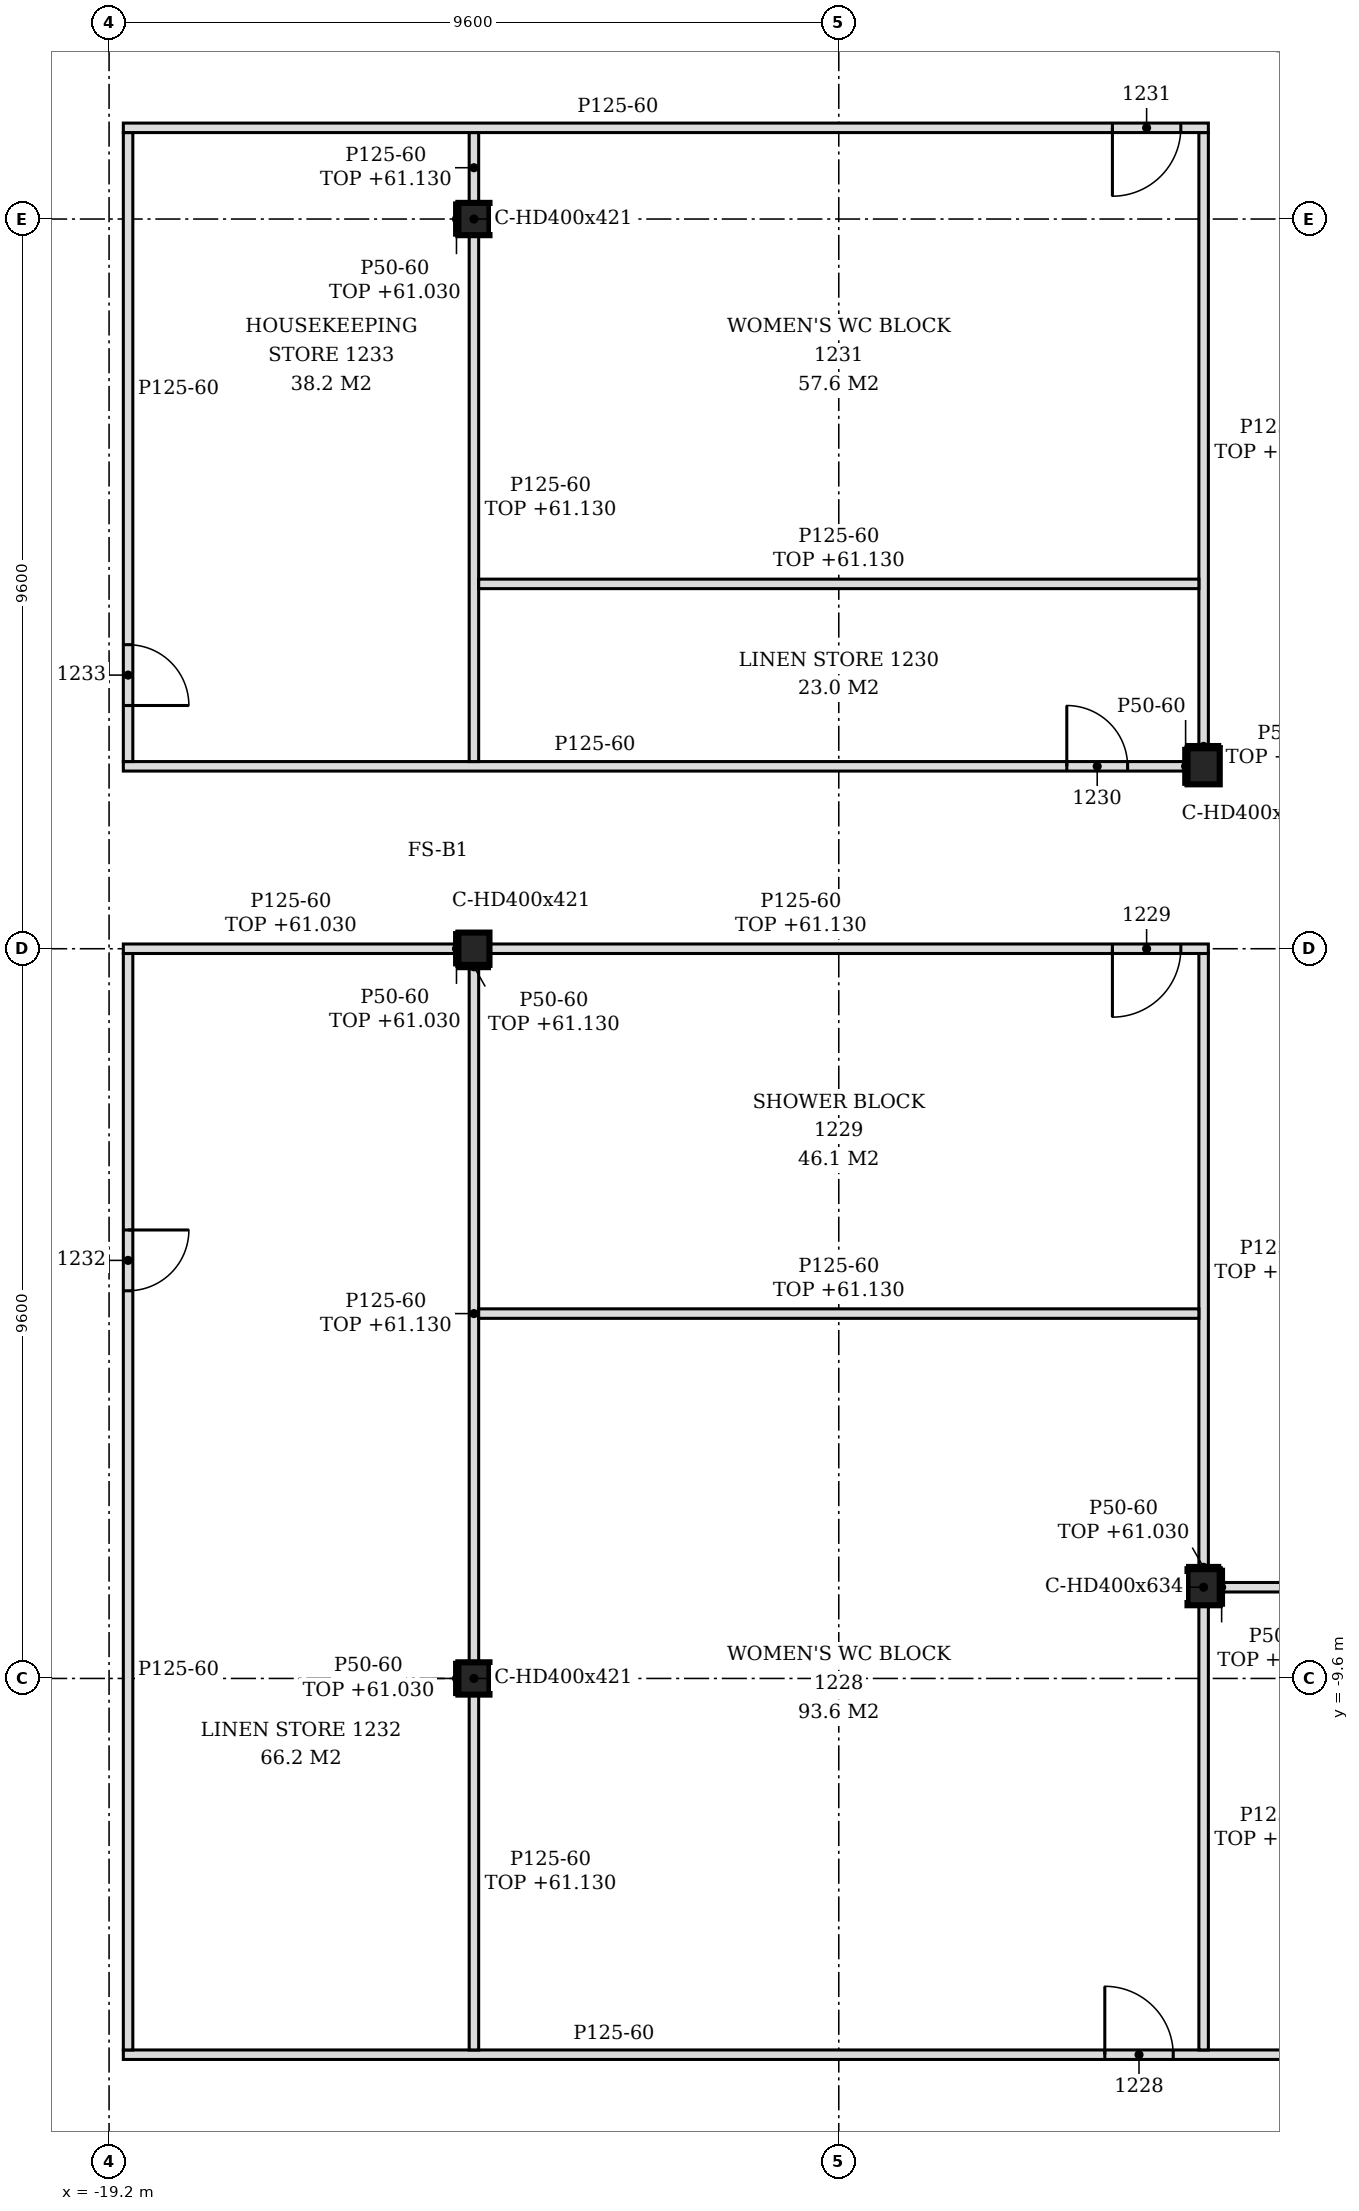
"""IFC4 building model, lengths in metres.
Left out: names, types, materials, properties, quantities, classifications, styles, units other than length and angle.
Written with IfcOpenShell. Run it as: python <this file> out.ifc"""

import sys

from ifc_helpers import new_model, si_unit, direction, frame, frame_2d, origin, origin_2d, place, context, subcontext, project, spatial, polyline, rectangle, i_section, outline, extrude, element, fill, save


model = new_model("IFC4")
c1 = context("Model", 3, precision=1e-05, world=origin(), true_north=direction((0.0, 1.0)))
c2 = subcontext(c1, "Body", "Model", "MODEL_VIEW")
j1 = project(units=[si_unit("LENGTHUNIT", "METRE"), si_unit("PLANEANGLEUNIT", "RADIAN")], contexts=[c1])
p1 = place(None, origin())
s1 = spatial("IfcSite", under=j1, at=p1, CompositionType="ELEMENT")
p2 = place(p1, origin())
s2 = spatial("IfcBuilding", under=s1, at=p2, CompositionType="ELEMENT")
p3 = place(p2, frame((0.0, 0.0, 58.2)))
s3 = spatial("IfcBuildingStorey", under=s2, at=p3, CompositionType="ELEMENT", Elevation=58.2)
for number, where, z_axis, x_axis in (
    (1, (-4.8, -8.4, -0.15), (0.0, 0.0, 1.0), (1.0, 0.0, 0.0)),
    (2, (-4.8, 2.4, -0.15), (0.0, 0.0, 1.0), (1.0, 0.0, 0.0)),
):
    element("IfcColumn", number, at=place(p3, frame(where, z_axis=z_axis, x_axis=x_axis)), inside=s3, PredefinedType="COLUMN", context=c2, shape_type="SweptSolid", body=[
        extrude(i_section(OverallWidth=0.424, OverallDepth=0.474, WebThickness=0.048, FlangeThickness=0.077, FilletRadius=0.015, at=origin_2d()), origin(), (0.0, 0.0, 1.0), 3.6),
    ])
for number, where, z_axis, x_axis in (
    (3, (-14.4, -9.6, -0.15), (0.0, 0.0, 1.0), (1.0, 0.0, 0.0)),
    (4, (-14.4, 0.0, -0.15), (0.0, 0.0, 1.0), (1.0, 0.0, 0.0)),
    (5, (-14.4, 9.6, -0.15), (0.0, 0.0, 1.0), (1.0, 0.0, 0.0)),
):
    element("IfcColumn", number, at=place(p3, frame(where, z_axis=z_axis, x_axis=x_axis)), inside=s3, PredefinedType="COLUMN", context=c2, shape_type="SweptSolid", body=[
        extrude(i_section(OverallWidth=0.409, OverallDepth=0.425, WebThickness=0.033, FlangeThickness=0.052, FilletRadius=0.015, at=origin_2d()), origin(), (0.0, 0.0, 1.0), 3.6),
    ])
p4 = place(p3, frame((-19.012, -14.55, 0.0), z_axis=(0.0, 0.0, 1.0), x_axis=(1.0, 0.0, 0.0)))
e6 = element("IfcWall", 6, at=p4, inside=s3, PredefinedType="PARTITIONING", context=c2, shape_type="SweptSolid", body=[
    extrude(outline(polyline([(0.0, 0.0), (19.075, 0.0), (19.075, 3.45), (14.363, 3.45), (14.361, 2.73), (14.062, 2.73), (14.061, 3.45), (4.762, 3.45), (4.76, 2.93), (4.462, 2.93), (4.46, 2.83), (0.0, 2.83), (0.0, 0.0)])), frame((0.0, 0.062, 0.0), z_axis=(0.0, -1.0, 0.0), x_axis=(1.0, 0.0, 0.0)), (0.0, 0.0, 1.0), 0.125),
])
p5 = place(p4, frame((12.913, 0.0, 0.0)))
e7 = element("IfcOpeningElement", 7, at=p5, cuts=e6, PredefinedType="OPENING", context=c2, shape_type="SweptSolid", body=[
    extrude(rectangle(XDim=0.9, YDim=2.1, at=frame_2d((0.45, 1.05))), frame((0.0, 0.073, 0.0), z_axis=(0.0, -1.0, 0.0), x_axis=(1.0, 0.0, 0.0)), (0.0, 0.0, 1.0), 0.145),
])
p6 = place(p3, frame((-18.95, -14.488, 0.0), z_axis=(0.0, 0.0, 1.0), x_axis=(0.0, 1.0, 0.0)))
e8 = element("IfcWall", 8, at=p6, inside=s3, PredefinedType="PARTITIONING", context=c2, shape_type="SweptSolid", body=[
    extrude(outline(polyline([(0.0, 0.0), (14.425, 0.0), (14.425, 2.83), (14.377, 2.83), (14.375, 3.45), (9.798, 3.45), (9.795, 2.83), (9.577, 2.83), (9.575, 3.45), (4.998, 3.45), (4.996, 2.83), (4.778, 2.83), (4.775, 3.45), (0.198, 3.45), (0.196, 2.83), (0.0, 2.83), (0.0, 0.0)])), frame((0.0, 0.062, 0.0), z_axis=(0.0, -1.0, 0.0), x_axis=(1.0, 0.0, 0.0)), (0.0, 0.0, 1.0), 0.125),
])
p7 = place(p6, frame((9.988, 0.0, 0.0)))
e9 = element("IfcOpeningElement", 9, at=p7, cuts=e8, PredefinedType="OPENING", context=c2, shape_type="SweptSolid", body=[
    extrude(rectangle(XDim=0.8, YDim=2.1, at=frame_2d((0.4, 1.05))), frame((0.0, 0.073, 0.0), z_axis=(0.0, -1.0, 0.0), x_axis=(1.0, 0.0, 0.0)), (0.0, 0.0, 1.0), 0.145),
])
p8 = place(p3, frame((-14.4, -14.488, 0.0), z_axis=(0.0, 0.0, 1.0), x_axis=(0.0, 1.0, 0.0)))
e10 = element("IfcWall", 10, at=p8, inside=s3, PredefinedType="PARTITIONING", context=c2, shape_type="SweptSolid", body=[
    extrude(rectangle(XDim=4.675, YDim=0.125, at=frame_2d((2.337, 0.0))), origin(), (0.0, 0.0, 1.0), 2.93),
])
p9 = place(p3, frame((-4.8, -14.488, 0.0), z_axis=(0.0, 0.0, 1.0), x_axis=(0.0, 1.0, 0.0)))
e11 = element("IfcWall", 11, at=p9, inside=s3, PredefinedType="PARTITIONING", context=c2, shape_type="SweptSolid", body=[
    extrude(rectangle(XDim=5.851, YDim=0.125, at=frame_2d((2.925, 0.0))), origin(), (0.0, 0.0, 1.0), 2.73),
])
p10 = place(p3, frame((-14.4, -9.387, 0.0), z_axis=(0.0, 0.0, 1.0), x_axis=(0.0, 1.0, 0.0)))
e12 = element("IfcWall", 12, at=p10, inside=s3, PredefinedType="PARTITIONING", context=c2, shape_type="SweptSolid", body=[
    extrude(rectangle(XDim=9.175, YDim=0.125, at=frame_2d((4.587, 0.0))), origin(), (0.0, 0.0, 1.0), 2.93),
])
p11 = place(p3, frame((-4.588, -8.4, 0.0), z_axis=(0.0, 0.0, 1.0), x_axis=(1.0, 0.0, 0.0)))
e13 = element("IfcWall", 13, at=p11, inside=s3, PredefinedType="PARTITIONING", context=c2, shape_type="SweptSolid", body=[
    extrude(rectangle(XDim=4.65, YDim=0.125, at=frame_2d((2.325, 0.0))), origin(), (0.0, 0.0, 1.0), 2.83),
])
p12 = place(p3, frame((-4.8, -8.163, 0.0), z_axis=(0.0, 0.0, 1.0), x_axis=(0.0, 1.0, 0.0)))
e14 = element("IfcWall", 14, at=p12, inside=s3, PredefinedType="PARTITIONING", context=c2, shape_type="SweptSolid", body=[
    extrude(rectangle(XDim=8.101, YDim=0.125, at=frame_2d((4.05, 0.0))), origin(), (0.0, 0.0, 1.0), 2.83),
])
p13 = place(p3, frame((-14.337, -4.8, 0.0), z_axis=(0.0, 0.0, 1.0), x_axis=(1.0, 0.0, 0.0)))
e15 = element("IfcWall", 15, at=p13, inside=s3, PredefinedType="PARTITIONING", context=c2, shape_type="SweptSolid", body=[
    extrude(outline(polyline([(0.0, 0.0), (9.475, 0.0), (9.475, 2.83), (9.387, 2.83), (9.385, 2.93), (0.0, 2.93), (0.0, 0.0)])), frame((0.0, 0.062, 0.0), z_axis=(0.0, -1.0, 0.0), x_axis=(1.0, 0.0, 0.0)), (0.0, 0.0, 1.0), 0.125),
])
p14 = place(p3, frame((-19.012, 0.0, 0.0), z_axis=(0.0, 0.0, 1.0), x_axis=(1.0, 0.0, 0.0)))
e16 = element("IfcWall", 16, at=p14, inside=s3, PredefinedType="PARTITIONING", context=c2, shape_type="SweptSolid", body=[
    extrude(rectangle(XDim=4.408, YDim=0.125, at=frame_2d((2.204, 0.0))), origin(), (0.0, 0.0, 1.0), 2.83),
])
p15 = place(p3, frame((-14.196, 0.0, 0.0), z_axis=(0.0, 0.0, 1.0), x_axis=(1.0, 0.0, 0.0)))
e17 = element("IfcWall", 17, at=p15, inside=s3, PredefinedType="PARTITIONING", context=c2, shape_type="SweptSolid", body=[
    extrude(outline(polyline([(0.0, 0.0), (9.458, 0.0), (9.458, 2.83), (9.246, 2.83), (9.243, 2.93), (0.0, 2.93), (0.0, 0.0)])), frame((0.0, 0.062, 0.0), z_axis=(0.0, -1.0, 0.0), x_axis=(1.0, 0.0, 0.0)), (0.0, 0.0, 1.0), 0.125),
])
p16 = place(p15, frame((8.196, 0.0, 0.0)))
e18 = element("IfcOpeningElement", 18, at=p16, cuts=e17, PredefinedType="OPENING", context=c2, shape_type="SweptSolid", body=[
    extrude(rectangle(XDim=0.9, YDim=2.1, at=frame_2d((0.45, 1.05))), frame((0.0, 0.073, 0.0), z_axis=(0.0, -1.0, 0.0), x_axis=(1.0, 0.0, 0.0)), (0.0, 0.0, 1.0), 0.145),
])
p17 = place(p3, frame((-19.012, 2.4, 0.0), z_axis=(0.0, 0.0, 1.0), x_axis=(1.0, 0.0, 0.0)))
e19 = element("IfcWall", 19, at=p17, inside=s3, PredefinedType="PARTITIONING", context=c2, shape_type="SweptSolid", body=[
    extrude(outline(polyline([(0.0, 0.0), (14.0, 0.0), (14.0, 3.45), (4.762, 3.45), (4.76, 2.93), (4.462, 2.93), (4.46, 3.45), (0.0, 3.45), (0.0, 0.0)])), frame((0.0, 0.062, 0.0), z_axis=(0.0, -1.0, 0.0), x_axis=(1.0, 0.0, 0.0)), (0.0, 0.0, 1.0), 0.125),
])
p18 = place(p17, frame((12.413, 0.0, 0.0)))
e20 = element("IfcOpeningElement", 20, at=p18, cuts=e19, PredefinedType="OPENING", context=c2, shape_type="SweptSolid", body=[
    extrude(rectangle(XDim=0.8, YDim=2.1, at=frame_2d((0.4, 1.05))), frame((0.0, 0.073, 0.0), z_axis=(0.0, -1.0, 0.0), x_axis=(1.0, 0.0, 0.0)), (0.0, 0.0, 1.0), 0.145),
])
p19 = place(p3, frame((-18.95, 2.462, 0.0), z_axis=(0.0, 0.0, 1.0), x_axis=(0.0, 1.0, 0.0)))
e21 = element("IfcWall", 21, at=p19, inside=s3, PredefinedType="PARTITIONING", context=c2, shape_type="SweptSolid", body=[
    extrude(outline(polyline([(0.0, 0.0), (8.275, 0.0), (8.275, 3.45), (7.248, 3.45), (7.246, 2.83), (7.028, 2.83), (7.025, 3.45), (2.448, 3.45), (2.446, 2.83), (2.228, 2.83), (2.226, 3.45), (0.0, 3.45), (0.0, 0.0)])), frame((0.0, 0.062, 0.0), z_axis=(0.0, -1.0, 0.0), x_axis=(1.0, 0.0, 0.0)), (0.0, 0.0, 1.0), 0.125),
])
p20 = place(p19, frame((0.738, 0.0, 0.0)))
e22 = element("IfcOpeningElement", 22, at=p20, cuts=e21, PredefinedType="OPENING", context=c2, shape_type="SweptSolid", body=[
    extrude(rectangle(XDim=0.8, YDim=2.1, at=frame_2d((0.4, 1.05))), frame((0.0, 0.073, 0.0), z_axis=(0.0, -1.0, 0.0), x_axis=(1.0, 0.0, 0.0)), (0.0, 0.0, 1.0), 0.145),
])
p21 = place(p3, frame((-14.4, 2.462, 0.0), z_axis=(0.0, 0.0, 1.0), x_axis=(0.0, 1.0, 0.0)))
e23 = element("IfcWall", 23, at=p21, inside=s3, PredefinedType="PARTITIONING", context=c2, shape_type="SweptSolid", body=[
    extrude(rectangle(XDim=6.925, YDim=0.125, at=frame_2d((3.462, 0.0))), origin(), (0.0, 0.0, 1.0), 2.93),
])
p22 = place(p3, frame((-4.8, 2.637, 0.0), z_axis=(0.0, 0.0, 1.0), x_axis=(0.0, 1.0, 0.0)))
e24 = element("IfcWall", 24, at=p22, inside=s3, PredefinedType="PARTITIONING", context=c2, shape_type="SweptSolid", body=[
    extrude(rectangle(XDim=8.101, YDim=0.125, at=frame_2d((4.05, 0.0))), origin(), (0.0, 0.0, 1.0), 2.83),
])
p23 = place(p3, frame((-14.337, 4.8, 0.0), z_axis=(0.0, 0.0, 1.0), x_axis=(1.0, 0.0, 0.0)))
e25 = element("IfcWall", 25, at=p23, inside=s3, PredefinedType="PARTITIONING", context=c2, shape_type="SweptSolid", body=[
    extrude(outline(polyline([(0.0, 0.0), (9.475, 0.0), (9.475, 2.83), (9.387, 2.83), (9.385, 2.93), (0.0, 2.93), (0.0, 0.0)])), frame((0.0, 0.062, 0.0), z_axis=(0.0, -1.0, 0.0), x_axis=(1.0, 0.0, 0.0)), (0.0, 0.0, 1.0), 0.125),
])
p24 = place(p3, frame((-14.4, 9.812, 0.0), z_axis=(0.0, 0.0, 1.0), x_axis=(0.0, 1.0, 0.0)))
e26 = element("IfcWall", 26, at=p24, inside=s3, PredefinedType="PARTITIONING", context=c2, shape_type="SweptSolid", body=[
    extrude(rectangle(XDim=0.925, YDim=0.125, at=frame_2d((0.462, 0.0))), origin(), (0.0, 0.0, 1.0), 2.93),
])
p25 = place(p3, frame((-19.012, 10.8, 0.0), z_axis=(0.0, 0.0, 1.0), x_axis=(1.0, 0.0, 0.0)))
e27 = element("IfcWall", 27, at=p25, inside=s3, PredefinedType="PARTITIONING", context=c2, shape_type="SweptSolid", body=[
    extrude(outline(polyline([(0.0, 0.0), (14.275, 0.0), (14.275, 2.83), (14.062, 2.83), (14.061, 3.45), (4.762, 3.45), (4.76, 2.93), (4.462, 2.93), (4.46, 3.45), (0.0, 3.45), (0.0, 0.0)])), frame((0.0, 0.062, 0.0), z_axis=(0.0, -1.0, 0.0), x_axis=(1.0, 0.0, 0.0)), (0.0, 0.0, 1.0), 0.125),
])
p26 = place(p25, frame((13.012, 0.0, 0.0)))
e28 = element("IfcOpeningElement", 28, at=p26, cuts=e27, PredefinedType="OPENING", context=c2, shape_type="SweptSolid", body=[
    extrude(rectangle(XDim=0.9, YDim=2.1, at=frame_2d((0.45, 1.05))), frame((0.0, 0.073, 0.0), z_axis=(0.0, -1.0, 0.0), x_axis=(1.0, 0.0, 0.0)), (0.0, 0.0, 1.0), 0.145),
])
p27 = place(p3, frame((-14.629, -9.812, 0.0), z_axis=(0.0, 0.0, 1.0), x_axis=(0.0, 1.0, 0.0)))
e29 = element("IfcWall", 29, at=p27, inside=s3, PredefinedType="PARTITIONING", context=c2, shape_type="SweptSolid", body=[
    extrude(rectangle(XDim=0.425, YDim=0.05, at=frame_2d((0.212, 0.0))), origin(), (0.0, 0.0, 1.0), 2.83),
])
p28 = place(p3, frame((-14.629, -0.212, 0.0), z_axis=(0.0, 0.0, 1.0), x_axis=(0.0, 1.0, 0.0)))
e30 = element("IfcWall", 30, at=p28, inside=s3, PredefinedType="PARTITIONING", context=c2, shape_type="SweptSolid", body=[
    extrude(rectangle(XDim=0.425, YDim=0.05, at=frame_2d((0.212, 0.0))), origin(), (0.0, 0.0, 1.0), 2.83),
])
p29 = place(p3, frame((-4.563, -8.637, 0.0), z_axis=(0.0, 0.0, 1.0), x_axis=(0.0, 1.0, 0.0)))
e31 = element("IfcWall", 31, at=p29, inside=s3, PredefinedType="PARTITIONING", context=c2, shape_type="SweptSolid", body=[
    extrude(rectangle(XDim=0.474, YDim=0.05, at=frame_2d((0.237, 0.0))), origin(), (0.0, 0.0, 1.0), 2.83),
])
p30 = place(p3, frame((-5.012, -8.138, 0.0), z_axis=(0.0, 0.0, 1.0), x_axis=(1.0, 0.0, 0.0)))
e32 = element("IfcWall", 32, at=p30, inside=s3, PredefinedType="PARTITIONING", context=c2, shape_type="SweptSolid", body=[
    extrude(rectangle(XDim=0.424, YDim=0.05, at=frame_2d((0.212, 0.0))), origin(), (0.0, 0.0, 1.0), 2.83),
])
p31 = place(p3, frame((-14.604, -0.238, 0.0), z_axis=(0.0, 0.0, 1.0), x_axis=(1.0, 0.0, 0.0)))
e33 = element("IfcWall", 33, at=p31, inside=s3, PredefinedType="PARTITIONING", context=c2, shape_type="SweptSolid", body=[
    extrude(rectangle(XDim=0.409, YDim=0.05, at=frame_2d((0.205, 0.0))), origin(), (0.0, 0.0, 1.0), 2.93),
])
p32 = place(p3, frame((-5.012, 2.662, 0.0), z_axis=(0.0, 0.0, 1.0), x_axis=(1.0, 0.0, 0.0)))
e34 = element("IfcWall", 34, at=p32, inside=s3, PredefinedType="PARTITIONING", context=c2, shape_type="SweptSolid", body=[
    extrude(rectangle(XDim=0.424, YDim=0.05, at=frame_2d((0.212, 0.0))), origin(), (0.0, 0.0, 1.0), 2.83),
])
p33 = place(p3, frame((-14.629, 9.387, 0.0), z_axis=(0.0, 0.0, 1.0), x_axis=(0.0, 1.0, 0.0)))
e35 = element("IfcWall", 35, at=p33, inside=s3, PredefinedType="PARTITIONING", context=c2, shape_type="SweptSolid", body=[
    extrude(rectangle(XDim=0.425, YDim=0.05, at=frame_2d((0.212, 0.0))), origin(), (0.0, 0.0, 1.0), 2.83),
])
p34 = place(p3, frame((-5.037, 2.163, 0.0), z_axis=(0.0, 0.0, 1.0), x_axis=(0.0, 1.0, 0.0)))
e36 = element("IfcWall", 36, at=p34, inside=s3, PredefinedType="PARTITIONING", context=c2, shape_type="SweptSolid", body=[
    extrude(rectangle(XDim=0.474, YDim=0.05, at=frame_2d((0.237, 0.0))), origin(), (0.0, 0.0, 1.0), 3.45),
])
p35 = place(p5, origin())
e37 = element("IfcDoor", 37, at=p35, inside=s3, OperationType="SINGLE_SWING_LEFT", PredefinedType="DOOR", context=c2, shape_type="SweptSolid", body=[
    extrude(rectangle(XDim=0.9, YDim=2.1, at=frame_2d((0.45, 1.05))), frame((0.0, 0.025, 0.0), z_axis=(0.0, -1.0, 0.0), x_axis=(1.0, 0.0, 0.0)), (0.0, 0.0, 1.0), 0.05),
])
fill(e7, e37)
p36 = place(p16, frame((0.9, 0.0, 0.0), z_axis=(0.0, 0.0, 1.0), x_axis=(-1.0, 0.0, 0.0)))
e38 = element("IfcDoor", 38, at=p36, inside=s3, OperationType="SINGLE_SWING_RIGHT", PredefinedType="DOOR", context=c2, shape_type="SweptSolid", body=[
    extrude(rectangle(XDim=0.9, YDim=2.1, at=frame_2d((0.45, 1.05))), frame((0.0, 0.025, 0.0), z_axis=(0.0, -1.0, 0.0), x_axis=(1.0, 0.0, 0.0)), (0.0, 0.0, 1.0), 0.05),
])
fill(e18, e38)
p37 = place(p18, origin())
e39 = element("IfcDoor", 39, at=p37, inside=s3, OperationType="SINGLE_SWING_LEFT", PredefinedType="DOOR", context=c2, shape_type="SweptSolid", body=[
    extrude(rectangle(XDim=0.8, YDim=2.1, at=frame_2d((0.4, 1.05))), frame((0.0, 0.025, 0.0), z_axis=(0.0, -1.0, 0.0), x_axis=(1.0, 0.0, 0.0)), (0.0, 0.0, 1.0), 0.05),
])
fill(e20, e39)
p38 = place(p26, frame((0.9, 0.0, 0.0), z_axis=(0.0, 0.0, 1.0), x_axis=(-1.0, 0.0, 0.0)))
e40 = element("IfcDoor", 40, at=p38, inside=s3, OperationType="SINGLE_SWING_RIGHT", PredefinedType="DOOR", context=c2, shape_type="SweptSolid", body=[
    extrude(rectangle(XDim=0.9, YDim=2.1, at=frame_2d((0.45, 1.05))), frame((0.0, 0.025, 0.0), z_axis=(0.0, -1.0, 0.0), x_axis=(1.0, 0.0, 0.0)), (0.0, 0.0, 1.0), 0.05),
])
fill(e28, e40)
p39 = place(p7, frame((0.8, 0.0, 0.0), z_axis=(0.0, 0.0, 1.0), x_axis=(-1.0, 0.0, 0.0)))
e41 = element("IfcDoor", 41, at=p39, inside=s3, OperationType="SINGLE_SWING_LEFT", PredefinedType="DOOR", context=c2, shape_type="SweptSolid", body=[
    extrude(rectangle(XDim=0.8, YDim=2.1, at=frame_2d((0.4, 1.05))), frame((0.0, 0.025, 0.0), z_axis=(0.0, -1.0, 0.0), x_axis=(1.0, 0.0, 0.0)), (0.0, 0.0, 1.0), 0.05),
])
fill(e9, e41)
p40 = place(p20, frame((0.8, 0.0, 0.0), z_axis=(0.0, 0.0, 1.0), x_axis=(-1.0, 0.0, 0.0)))
e42 = element("IfcDoor", 42, at=p40, inside=s3, OperationType="SINGLE_SWING_RIGHT", PredefinedType="DOOR", context=c2, shape_type="SweptSolid", body=[
    extrude(rectangle(XDim=0.8, YDim=2.1, at=frame_2d((0.4, 1.05))), frame((0.0, 0.025, 0.0), z_axis=(0.0, -1.0, 0.0), x_axis=(1.0, 0.0, 0.0)), (0.0, 0.0, 1.0), 0.05),
])
fill(e22, e42)
save(model, sys.argv[1])
